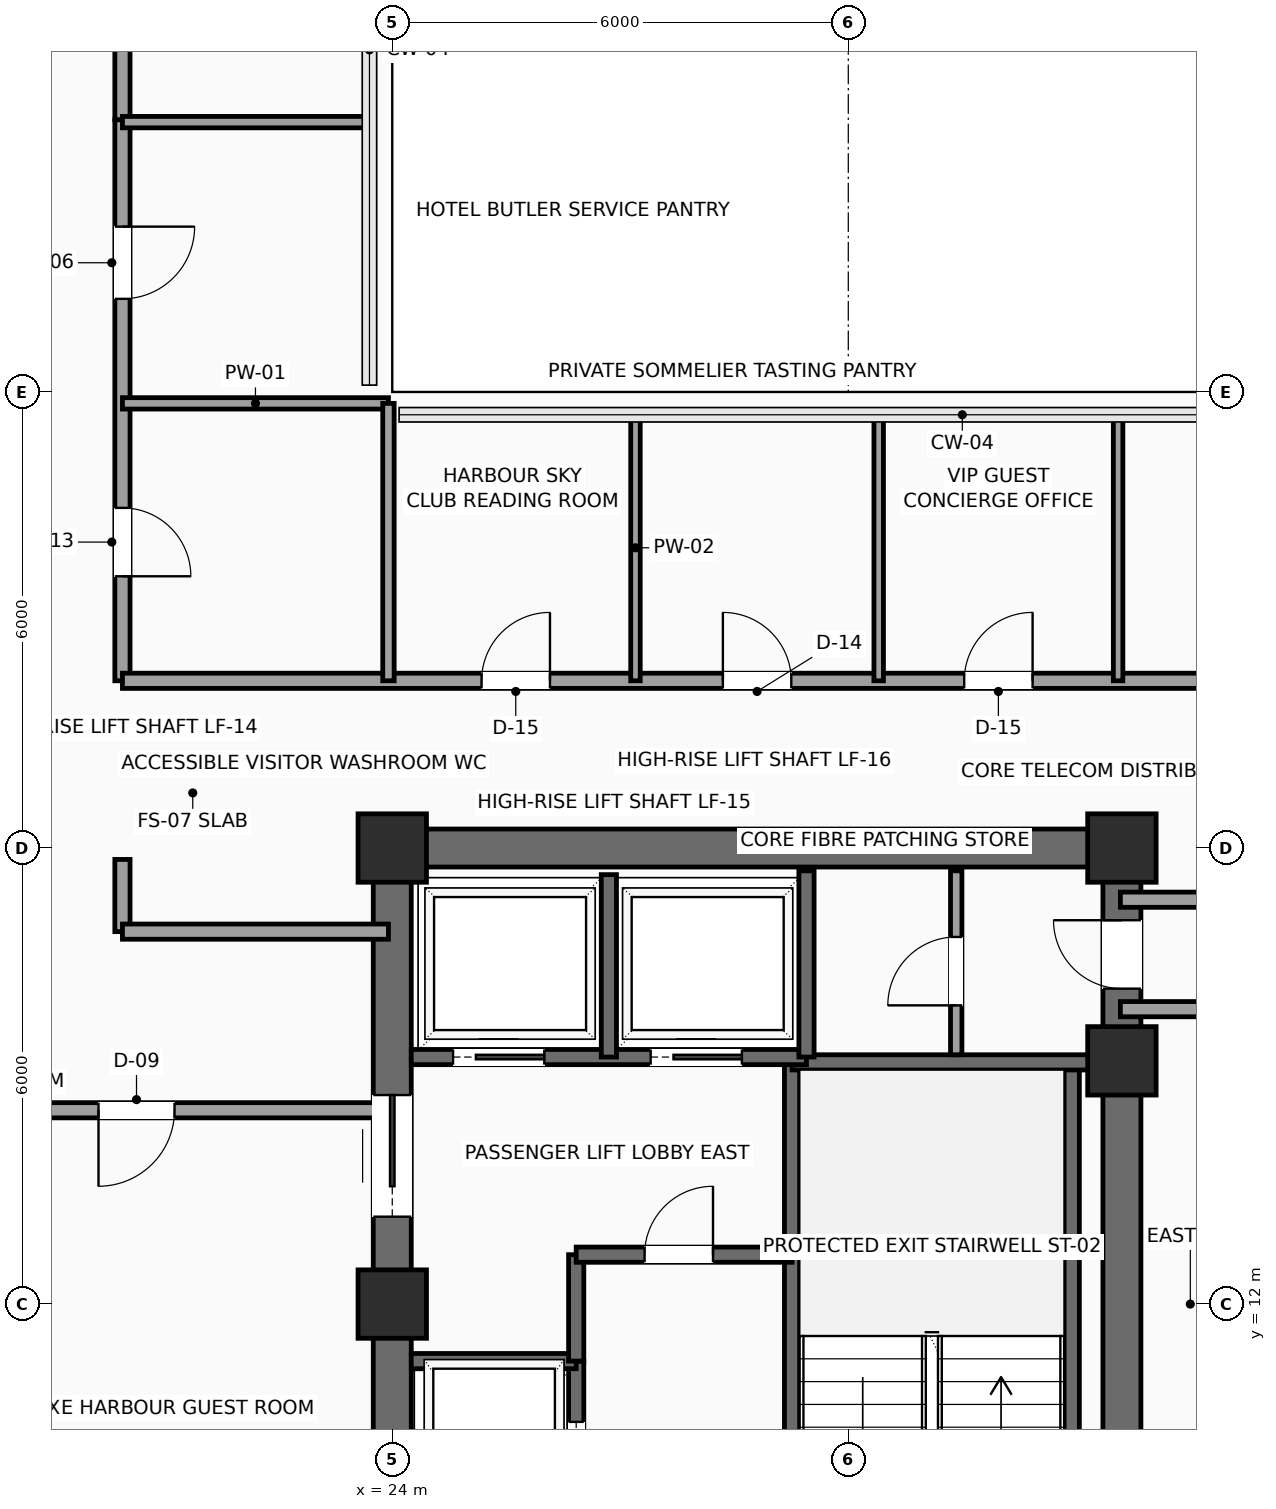
"""IFC4 building model, lengths in metres.
Left out: names, types, materials, properties, quantities, classifications, styles, units other than length and angle.
Written with IfcOpenShell. Run it as: python <this file> out.ifc"""

import sys

from ifc_helpers import new_model, si_unit, direction, frame, frame_2d, origin, origin_2d, place, context, subcontext, project, spatial, rectangle, extrude, element, fill, save


model = new_model("IFC4")
c1 = context("Model", 3, precision=1e-05, world=origin(), true_north=direction((0.0, 1.0)))
c2 = subcontext(c1, "Body", "Model", "MODEL_VIEW")
j1 = project(units=[si_unit("LENGTHUNIT", "METRE"), si_unit("PLANEANGLEUNIT", "RADIAN")], contexts=[c1])
p1 = place(None, origin())
s1 = spatial("IfcSite", under=j1, at=p1, CompositionType="ELEMENT")
p2 = place(p1, origin())
s2 = spatial("IfcBuilding", under=s1, at=p2, CompositionType="ELEMENT")
p3 = place(p2, frame((0.0, 0.0, 216.15)))
s3 = spatial("IfcBuildingStorey", under=s2, at=p3, CompositionType="ELEMENT", Elevation=216.15)
for number, where, z_axis, x_axis in (
    (1, (24.0, 12.0, 0.0), (0.0, 0.0, 1.0), (1.0, 0.0, 0.0)),
    (2, (24.0, 18.0, 0.0), (0.0, 0.0, 1.0), (1.0, 0.0, 0.0)),
    (3, (33.6, 15.2, 0.0), (0.0, 0.0, 1.0), (1.0, 0.0, 0.0)),
    (4, (33.6, 18.0, 0.0), (0.0, 0.0, 1.0), (1.0, 0.0, 0.0)),
):
    element("IfcColumn", number, at=place(p3, frame(where, z_axis=z_axis, x_axis=x_axis)), inside=s3, PredefinedType="COLUMN", context=c2, shape_type="SweptSolid", body=[
        extrude(rectangle(XDim=0.9, YDim=0.9, at=origin_2d()), origin(), (0.0, 0.0, 1.0), 3.75),
    ])
p4 = place(p3, frame((24.0, 18.0, 0.0), z_axis=(0.0, 0.0, 1.0), x_axis=(1.0, 0.0, 0.0)))
e5 = element("IfcWall", 5, at=p4, inside=s3, PredefinedType="SHEAR", context=c2, shape_type="SweptSolid", body=[
    extrude(rectangle(XDim=9.6, YDim=0.5, at=frame_2d((4.8, 0.0))), origin(), (0.0, 0.0, 1.0), 3.54),
])
p5 = place(p3, frame((24.0, 6.0, 0.0), z_axis=(0.0, 0.0, 1.0), x_axis=(0.0, 1.0, 0.0)))
e6 = element("IfcWall", 6, at=p5, inside=s3, PredefinedType="SHEAR", context=c2, shape_type="SweptSolid", body=[
    extrude(rectangle(XDim=12.0, YDim=0.5, at=frame_2d((6.0, 0.0))), origin(), (0.0, 0.0, 1.0), 3.54),
])
p6 = place(p5, frame((7.15, 0.0, 0.0)))
e7 = element("IfcOpeningElement", 7, at=p6, cuts=e6, PredefinedType="OPENING", context=c2, shape_type="SweptSolid", body=[
    extrude(rectangle(XDim=1.6, YDim=2.3, at=frame_2d((0.8, 1.15))), frame((0.0, 0.26, 0.0), z_axis=(0.0, -1.0, 0.0), x_axis=(1.0, 0.0, 0.0)), (0.0, 0.0, 1.0), 0.52),
])
p7 = place(p3, frame((33.6, 6.0, 0.0), z_axis=(0.0, 0.0, 1.0), x_axis=(0.0, 1.0, 0.0)))
e8 = element("IfcWall", 8, at=p7, inside=s3, PredefinedType="SHEAR", context=c2, shape_type="SweptSolid", body=[
    extrude(rectangle(XDim=12.0, YDim=0.5, at=frame_2d((6.0, 0.0))), origin(), (0.0, 0.0, 1.0), 3.54),
])
p8 = place(p7, frame((10.15, 0.0, 0.0)))
e9 = element("IfcOpeningElement", 9, at=p8, cuts=e8, PredefinedType="OPENING", context=c2, shape_type="SweptSolid", body=[
    extrude(rectangle(XDim=0.9, YDim=2.15, at=frame_2d((0.45, 1.075))), frame((0.0, 0.26, 0.0), z_axis=(0.0, -1.0, 0.0), x_axis=(1.0, 0.0, 0.0)), (0.0, 0.0, 1.0), 0.52),
])
p9 = place(p3, frame((29.26, 6.3, 0.0), z_axis=(0.0, 0.0, 1.0), x_axis=(0.0, 1.0, 0.0)))
e10 = element("IfcWall", 10, at=p9, inside=s3, PredefinedType="SHEAR", context=c2, shape_type="SweptSolid", body=[
    extrude(rectangle(XDim=8.88, YDim=0.2, at=frame_2d((4.44, 0.0))), origin(), (0.0, 0.0, 1.0), 3.54),
])
p10 = place(p9, frame((0.35, 0.0, 0.0)))
e11 = element("IfcOpeningElement", 11, at=p10, cuts=e10, PredefinedType="OPENING", context=c2, shape_type="SweptSolid", body=[
    extrude(rectangle(XDim=1.1, YDim=2.2, at=frame_2d((0.55, 1.1))), frame((0.0, 0.11, 0.0), z_axis=(0.0, -1.0, 0.0), x_axis=(1.0, 0.0, 0.0)), (0.0, 0.0, 1.0), 0.22),
])
p11 = place(p3, frame((32.94, 6.3, 0.0), z_axis=(0.0, 0.0, 1.0), x_axis=(0.0, 1.0, 0.0)))
e12 = element("IfcWall", 12, at=p11, inside=s3, PredefinedType="SHEAR", context=c2, shape_type="SweptSolid", body=[
    extrude(rectangle(XDim=8.88, YDim=0.2, at=frame_2d((4.44, 0.0))), origin(), (0.0, 0.0, 1.0), 3.54),
])
p12 = place(p3, frame((29.26, 15.18, 0.0), z_axis=(0.0, 0.0, 1.0), x_axis=(1.0, 0.0, 0.0)))
e13 = element("IfcWall", 13, at=p12, inside=s3, PredefinedType="SHEAR", context=c2, shape_type="SweptSolid", body=[
    extrude(rectangle(XDim=4.04, YDim=0.2, at=frame_2d((2.02, 0.0))), origin(), (0.0, 0.0, 1.0), 3.54),
])
p13 = place(p3, frame((26.42, 6.3, 0.0), z_axis=(0.0, 0.0, 1.0), x_axis=(0.0, 1.0, 0.0)))
e14 = element("IfcWall", 14, at=p13, inside=s3, PredefinedType="SHEAR", context=c2, shape_type="SweptSolid", body=[
    extrude(rectangle(XDim=4.95, YDim=0.2, at=frame_2d((2.475, 0.0))), origin(), (0.0, 0.0, 1.0), 3.54),
])
p14 = place(p13, frame((0.65, 0.0, 0.0)))
e15 = element("IfcOpeningElement", 15, at=p14, cuts=e14, PredefinedType="OPENING", context=c2, shape_type="SweptSolid", body=[
    extrude(rectangle(XDim=1.1, YDim=2.2, at=frame_2d((0.55, 1.1))), frame((0.0, 0.11, 0.0), z_axis=(0.0, -1.0, 0.0), x_axis=(1.0, 0.0, 0.0)), (0.0, 0.0, 1.0), 0.22),
])
p15 = place(p13, frame((3.05, 0.0, 0.0)))
e16 = element("IfcOpeningElement", 16, at=p15, cuts=e14, PredefinedType="OPENING", context=c2, shape_type="SweptSolid", body=[
    extrude(rectangle(XDim=1.1, YDim=2.2, at=frame_2d((0.55, 1.1))), frame((0.0, 0.11, 0.0), z_axis=(0.0, -1.0, 0.0), x_axis=(1.0, 0.0, 0.0)), (0.0, 0.0, 1.0), 0.22),
])
p16 = place(p3, frame((24.25, 11.25, 0.0), z_axis=(0.0, 0.0, 1.0), x_axis=(1.0, 0.0, 0.0)))
e17 = element("IfcWall", 17, at=p16, inside=s3, PredefinedType="SHEAR", context=c2, shape_type="SweptSolid", body=[
    extrude(rectangle(XDim=2.17, YDim=0.2, at=frame_2d((1.085, 0.0))), origin(), (0.0, 0.0, 1.0), 3.54),
])
p17 = place(p3, frame((26.42, 11.25, 0.0), z_axis=(0.0, 0.0, 1.0), x_axis=(0.0, 1.0, 0.0)))
e18 = element("IfcWall", 18, at=p17, inside=s3, PredefinedType="SHEAR", context=c2, shape_type="SweptSolid", body=[
    extrude(rectangle(XDim=1.4, YDim=0.2, at=frame_2d((0.7, 0.0))), origin(), (0.0, 0.0, 1.0), 3.54),
])
p18 = place(p3, frame((26.42, 12.65, 0.0), z_axis=(0.0, 0.0, 1.0), x_axis=(1.0, 0.0, 0.0)))
e19 = element("IfcWall", 19, at=p18, inside=s3, PredefinedType="SHEAR", context=c2, shape_type="SweptSolid", body=[
    extrude(rectangle(XDim=2.84, YDim=0.2, at=frame_2d((1.42, 0.0))), origin(), (0.0, 0.0, 1.0), 3.54),
])
p19 = place(p18, frame((0.9, 0.0, 0.0)))
e20 = element("IfcOpeningElement", 20, at=p19, cuts=e19, PredefinedType="OPENING", context=c2, shape_type="SweptSolid", body=[
    extrude(rectangle(XDim=0.9, YDim=2.15, at=frame_2d((0.45, 1.075))), frame((0.0, 0.11, 0.0), z_axis=(0.0, -1.0, 0.0), x_axis=(1.0, 0.0, 0.0)), (0.0, 0.0, 1.0), 0.22),
])
p20 = place(p3, frame((24.25, 15.25, 0.0), z_axis=(0.0, 0.0, 1.0), x_axis=(1.0, 0.0, 0.0)))
e21 = element("IfcWall", 21, at=p20, inside=s3, PredefinedType="SHEAR", context=c2, shape_type="SweptSolid", body=[
    extrude(rectangle(XDim=5.2, YDim=0.2, at=frame_2d((2.6, 0.0))), origin(), (0.0, 0.0, 1.0), 3.54),
])
p21 = place(p20, frame((0.55, 0.0, 0.0)))
e22 = element("IfcOpeningElement", 22, at=p21, cuts=e21, PredefinedType="OPENING", context=c2, shape_type="SweptSolid", body=[
    extrude(rectangle(XDim=1.2, YDim=2.2, at=frame_2d((0.6, 1.1))), frame((0.0, 0.11, 0.0), z_axis=(0.0, -1.0, 0.0), x_axis=(1.0, 0.0, 0.0)), (0.0, 0.0, 1.0), 0.22),
])
p22 = place(p20, frame((3.15, 0.0, 0.0)))
e23 = element("IfcOpeningElement", 23, at=p22, cuts=e21, PredefinedType="OPENING", context=c2, shape_type="SweptSolid", body=[
    extrude(rectangle(XDim=1.2, YDim=2.2, at=frame_2d((0.6, 1.1))), frame((0.0, 0.11, 0.0), z_axis=(0.0, -1.0, 0.0), x_axis=(1.0, 0.0, 0.0)), (0.0, 0.0, 1.0), 0.22),
])
p23 = place(p3, frame((26.85, 15.25, 0.0), z_axis=(0.0, 0.0, 1.0), x_axis=(0.0, 1.0, 0.0)))
e24 = element("IfcWall", 24, at=p23, inside=s3, PredefinedType="SHEAR", context=c2, shape_type="SweptSolid", body=[
    extrude(rectangle(XDim=2.4, YDim=0.2, at=frame_2d((1.2, 0.0))), origin(), (0.0, 0.0, 1.0), 3.54),
])
p24 = place(p3, frame((29.45, 15.25, 0.0), z_axis=(0.0, 0.0, 1.0), x_axis=(0.0, 1.0, 0.0)))
e25 = element("IfcWall", 25, at=p24, inside=s3, PredefinedType="SHEAR", context=c2, shape_type="SweptSolid", body=[
    extrude(rectangle(XDim=2.45, YDim=0.2, at=frame_2d((1.225, 0.0))), origin(), (0.0, 0.0, 1.0), 3.54),
])
p25 = place(p3, frame((31.42, 15.28, 0.0), z_axis=(0.0, 0.0, 1.0), x_axis=(0.0, 1.0, 0.0)))
e26 = element("IfcWall", 26, at=p25, inside=s3, PredefinedType="PARTITIONING", context=c2, shape_type="SweptSolid", body=[
    extrude(rectangle(XDim=2.42, YDim=0.15, at=frame_2d((1.21, 0.0))), origin(), (0.0, 0.0, 1.0), 3.54),
])
p26 = place(p25, frame((0.65, 0.0, 0.0)))
e27 = element("IfcOpeningElement", 27, at=p26, cuts=e26, PredefinedType="OPENING", context=c2, shape_type="SweptSolid", body=[
    extrude(rectangle(XDim=0.9, YDim=2.15, at=frame_2d((0.45, 1.075))), frame((0.0, 0.085, 0.0), z_axis=(0.0, -1.0, 0.0), x_axis=(1.0, 0.0, 0.0)), (0.0, 0.0, 1.0), 0.17),
])
p27 = place(p3, frame((20.45, 30.25, 0.0), z_axis=(0.0, 0.0, 1.0), x_axis=(0.0, -1.0, 0.0)))
e28 = element("IfcWall", 28, at=p27, inside=s3, PredefinedType="PARTITIONING", context=c2, shape_type="SweptSolid", body=[
    extrude(rectangle(XDim=2.67, YDim=0.2, at=frame_2d((1.335, 0.0))), origin(), (0.0, 0.0, 1.0), 3.54),
])
p28 = place(p3, frame((20.45, 27.58, 0.0), z_axis=(0.0, 0.0, 1.0), x_axis=(0.0, -1.0, 0.0)))
e29 = element("IfcWall", 29, at=p28, inside=s3, PredefinedType="PARTITIONING", context=c2, shape_type="SweptSolid", body=[
    extrude(rectangle(XDim=7.38, YDim=0.2, at=frame_2d((3.69, 0.0))), origin(), (0.0, 0.0, 1.0), 3.54),
])
p29 = place(p28, frame((5.105, 0.0, 0.0)))
e30 = element("IfcOpeningElement", 30, at=p29, cuts=e29, PredefinedType="OPENING", context=c2, shape_type="SweptSolid", body=[
    extrude(rectangle(XDim=0.9, YDim=2.1, at=frame_2d((0.45, 1.05))), frame((0.0, 0.11, 0.0), z_axis=(0.0, -1.0, 0.0), x_axis=(1.0, 0.0, 0.0)), (0.0, 0.0, 1.0), 0.22),
])
p30 = place(p28, frame((1.405, 0.0, 0.0)))
e31 = element("IfcOpeningElement", 31, at=p30, cuts=e29, PredefinedType="OPENING", context=c2, shape_type="SweptSolid", body=[
    extrude(rectangle(XDim=0.95, YDim=2.15, at=frame_2d((0.475, 1.075))), frame((0.0, 0.11, 0.0), z_axis=(0.0, -1.0, 0.0), x_axis=(1.0, 0.0, 0.0)), (0.0, 0.0, 1.0), 0.22),
])
p31 = place(p3, frame((20.45, 20.2, 0.0), z_axis=(0.0, 0.0, 1.0), x_axis=(1.0, 0.0, 0.0)))
e32 = element("IfcWall", 32, at=p31, inside=s3, PredefinedType="PARTITIONING", context=c2, shape_type="SweptSolid", body=[
    extrude(rectangle(XDim=15.7, YDim=0.2, at=frame_2d((7.85, 0.0))), origin(), (0.0, 0.0, 1.0), 3.54),
])
p32 = place(p31, frame((4.725, 0.0, 0.0)))
e33 = element("IfcOpeningElement", 33, at=p32, cuts=e32, PredefinedType="OPENING", context=c2, shape_type="SweptSolid", body=[
    extrude(rectangle(XDim=0.9, YDim=2.1, at=frame_2d((0.45, 1.05))), frame((0.0, 0.11, 0.0), z_axis=(0.0, -1.0, 0.0), x_axis=(1.0, 0.0, 0.0)), (0.0, 0.0, 1.0), 0.22),
])
p33 = place(p31, frame((7.9, 0.0, 0.0)))
e34 = element("IfcOpeningElement", 34, at=p33, cuts=e32, PredefinedType="OPENING", context=c2, shape_type="SweptSolid", body=[
    extrude(rectangle(XDim=0.9, YDim=2.1, at=frame_2d((0.45, 1.05))), frame((0.0, 0.11, 0.0), z_axis=(0.0, -1.0, 0.0), x_axis=(1.0, 0.0, 0.0)), (0.0, 0.0, 1.0), 0.22),
])
p34 = place(p31, frame((11.075, 0.0, 0.0)))
e35 = element("IfcOpeningElement", 35, at=p34, cuts=e32, PredefinedType="OPENING", context=c2, shape_type="SweptSolid", body=[
    extrude(rectangle(XDim=0.9, YDim=2.1, at=frame_2d((0.45, 1.05))), frame((0.0, 0.11, 0.0), z_axis=(0.0, -1.0, 0.0), x_axis=(1.0, 0.0, 0.0)), (0.0, 0.0, 1.0), 0.22),
])
for number, where, z_axis, x_axis in (
    (36, (36.15, 15.88, 0.0), (0.0, 0.0, 1.0), (-1.0, 0.0, 0.0)),
    (37, (33.58, 17.32, 0.0), (0.0, 0.0, 1.0), (1.0, 0.0, 0.0)),
):
    element("IfcWall", number, at=place(p3, frame(where, z_axis=z_axis, x_axis=x_axis)), inside=s3, PredefinedType="PARTITIONING", context=c2, shape_type="SweptSolid", body=[
        extrude(rectangle(XDim=2.57, YDim=0.2, at=frame_2d((1.285, 0.0))), origin(), (0.0, 0.0, 1.0), 3.54),
    ])
p35 = place(p3, frame((20.45, 17.85, 0.0), z_axis=(0.0, 0.0, 1.0), x_axis=(0.0, -1.0, 0.0)))
e38 = element("IfcWall", 38, at=p35, inside=s3, PredefinedType="PARTITIONING", context=c2, shape_type="SweptSolid", body=[
    extrude(rectangle(XDim=0.95, YDim=0.2, at=frame_2d((0.475, 0.0))), origin(), (0.0, 0.0, 1.0), 3.54),
])
p36 = place(p3, frame((20.45, 16.9, 0.0), z_axis=(0.0, 0.0, 1.0), x_axis=(1.0, 0.0, 0.0)))
e39 = element("IfcWall", 39, at=p36, inside=s3, PredefinedType="PARTITIONING", context=c2, shape_type="SweptSolid", body=[
    extrude(rectangle(XDim=3.5, YDim=0.2, at=frame_2d((1.75, 0.0))), origin(), (0.0, 0.0, 1.0), 3.54),
])
p37 = place(p3, frame((23.95, 14.55, 0.0), z_axis=(0.0, 0.0, 1.0), x_axis=(-1.0, 0.0, 0.0)))
e40 = element("IfcWall", 40, at=p37, inside=s3, PredefinedType="PARTITIONING", context=c2, shape_type="SweptSolid", body=[
    extrude(rectangle(XDim=9.0, YDim=0.2, at=frame_2d((4.5, 0.0))), origin(), (0.0, 0.0, 1.0), 3.54),
])
p38 = place(p37, frame((2.815, 0.0, 0.0)))
e41 = element("IfcOpeningElement", 41, at=p38, cuts=e40, PredefinedType="OPENING", context=c2, shape_type="SweptSolid", body=[
    extrude(rectangle(XDim=1.0, YDim=2.2, at=frame_2d((0.5, 1.1))), frame((0.0, 0.11, 0.0), z_axis=(0.0, -1.0, 0.0), x_axis=(1.0, 0.0, 0.0)), (0.0, 0.0, 1.0), 0.22),
])
p39 = place(p3, frame((20.45, 23.85, 0.0), z_axis=(0.0, 0.0, 1.0), x_axis=(1.0, 0.0, 0.0)))
e42 = element("IfcWall", 42, at=p39, inside=s3, PredefinedType="PARTITIONING", context=c2, shape_type="SweptSolid", body=[
    extrude(rectangle(XDim=3.5, YDim=0.15, at=frame_2d((1.75, 0.0))), origin(), (0.0, 0.0, 1.0), 3.54),
])
p40 = place(p3, frame((23.95, 20.2, 0.0), z_axis=(0.0, 0.0, 1.0), x_axis=(0.0, 1.0, 0.0)))
e43 = element("IfcWall", 43, at=p40, inside=s3, PredefinedType="PARTITIONING", context=c2, shape_type="SweptSolid", body=[
    extrude(rectangle(XDim=3.65, YDim=0.15, at=frame_2d((1.825, 0.0))), origin(), (0.0, 0.0, 1.0), 3.54),
])
p41 = place(p3, frame((20.45, 27.55, 0.0), z_axis=(0.0, 0.0, 1.0), x_axis=(1.0, 0.0, 0.0)))
e44 = element("IfcWall", 44, at=p41, inside=s3, PredefinedType="PARTITIONING", context=c2, shape_type="SweptSolid", body=[
    extrude(rectangle(XDim=3.25, YDim=0.15, at=frame_2d((1.625, 0.0))), origin(), (0.0, 0.0, 1.0), 3.54),
])
for number, where, z_axis, x_axis in (
    (45, (27.2, 20.2, 0.0), (0.0, 0.0, 1.0), (0.0, 1.0, 0.0)),
    (46, (30.4, 20.2, 0.0), (0.0, 0.0, 1.0), (0.0, 1.0, 0.0)),
    (47, (33.55, 20.2, 0.0), (0.0, 0.0, 1.0), (0.0, 1.0, 0.0)),
):
    element("IfcWall", number, at=place(p3, frame(where, z_axis=z_axis, x_axis=x_axis)), inside=s3, PredefinedType="PARTITIONING", context=c2, shape_type="SweptSolid", body=[
        extrude(rectangle(XDim=3.5, YDim=0.125, at=frame_2d((1.75, 0.0))), origin(), (0.0, 0.0, 1.0), 3.54),
    ])
p42 = place(p6, origin())
e48 = element("IfcDoor", 48, at=p42, inside=s3, OperationType="DOUBLE_DOOR_SLIDING", PredefinedType="DOOR", context=c2, shape_type="SweptSolid", body=[
    extrude(rectangle(XDim=1.6, YDim=2.3, at=frame_2d((0.8, 1.15))), frame((0.0, 0.025, 0.0), z_axis=(0.0, -1.0, 0.0), x_axis=(1.0, 0.0, 0.0)), (0.0, 0.0, 1.0), 0.05),
])
fill(e7, e48)
p43 = place(p8, origin())
e49 = element("IfcDoor", 49, at=p43, inside=s3, OperationType="SINGLE_SWING_RIGHT", PredefinedType="DOOR", context=c2, shape_type="SweptSolid", body=[
    extrude(rectangle(XDim=0.9, YDim=2.15, at=frame_2d((0.45, 1.075))), frame((0.0, 0.025, 0.0), z_axis=(0.0, -1.0, 0.0), x_axis=(1.0, 0.0, 0.0)), (0.0, 0.0, 1.0), 0.05),
])
fill(e9, e49)
p44 = place(p15, origin())
e50 = element("IfcDoor", 50, at=p44, inside=s3, OperationType="SLIDING_TO_LEFT", PredefinedType="DOOR", context=c2, shape_type="SweptSolid", body=[
    extrude(rectangle(XDim=1.1, YDim=2.2, at=frame_2d((0.55, 1.1))), frame((0.0, 0.025, 0.0), z_axis=(0.0, -1.0, 0.0), x_axis=(1.0, 0.0, 0.0)), (0.0, 0.0, 1.0), 0.05),
])
fill(e16, e50)
p45 = place(p19, origin())
e51 = element("IfcDoor", 51, at=p45, inside=s3, OperationType="SINGLE_SWING_RIGHT", PredefinedType="DOOR", context=c2, shape_type="SweptSolid", body=[
    extrude(rectangle(XDim=0.9, YDim=2.15, at=frame_2d((0.45, 1.075))), frame((0.0, 0.025, 0.0), z_axis=(0.0, -1.0, 0.0), x_axis=(1.0, 0.0, 0.0)), (0.0, 0.0, 1.0), 0.05),
])
fill(e20, e51)
p46 = place(p21, origin())
e52 = element("IfcDoor", 52, at=p46, inside=s3, OperationType="SLIDING_TO_RIGHT", PredefinedType="DOOR", context=c2, shape_type="SweptSolid", body=[
    extrude(rectangle(XDim=1.2, YDim=2.2, at=frame_2d((0.6, 1.1))), frame((0.0, 0.025, 0.0), z_axis=(0.0, -1.0, 0.0), x_axis=(1.0, 0.0, 0.0)), (0.0, 0.0, 1.0), 0.05),
])
fill(e22, e52)
p47 = place(p22, origin())
e53 = element("IfcDoor", 53, at=p47, inside=s3, OperationType="SLIDING_TO_RIGHT", PredefinedType="DOOR", context=c2, shape_type="SweptSolid", body=[
    extrude(rectangle(XDim=1.2, YDim=2.2, at=frame_2d((0.6, 1.1))), frame((0.0, 0.025, 0.0), z_axis=(0.0, -1.0, 0.0), x_axis=(1.0, 0.0, 0.0)), (0.0, 0.0, 1.0), 0.05),
])
fill(e23, e53)
p48 = place(p26, origin())
e54 = element("IfcDoor", 54, at=p48, inside=s3, OperationType="SINGLE_SWING_LEFT", PredefinedType="DOOR", context=c2, shape_type="SweptSolid", body=[
    extrude(rectangle(XDim=0.9, YDim=2.15, at=frame_2d((0.45, 1.075))), frame((0.0, 0.025, 0.0), z_axis=(0.0, -1.0, 0.0), x_axis=(1.0, 0.0, 0.0)), (0.0, 0.0, 1.0), 0.05),
])
fill(e27, e54)
p49 = place(p29, origin())
e55 = element("IfcDoor", 55, at=p49, inside=s3, OperationType="SINGLE_SWING_RIGHT", PredefinedType="DOOR", context=c2, shape_type="SweptSolid", body=[
    extrude(rectangle(XDim=0.9, YDim=2.1, at=frame_2d((0.45, 1.05))), frame((0.0, 0.025, 0.0), z_axis=(0.0, -1.0, 0.0), x_axis=(1.0, 0.0, 0.0)), (0.0, 0.0, 1.0), 0.05),
])
fill(e30, e55)
p50 = place(p30, origin())
e56 = element("IfcDoor", 56, at=p50, inside=s3, OperationType="SINGLE_SWING_LEFT", PredefinedType="DOOR", context=c2, shape_type="SweptSolid", body=[
    extrude(rectangle(XDim=0.95, YDim=2.15, at=frame_2d((0.475, 1.075))), frame((0.0, 0.025, 0.0), z_axis=(0.0, -1.0, 0.0), x_axis=(1.0, 0.0, 0.0)), (0.0, 0.0, 1.0), 0.05),
])
fill(e31, e56)
p51 = place(p32, origin())
e57 = element("IfcDoor", 57, at=p51, inside=s3, OperationType="SINGLE_SWING_RIGHT", PredefinedType="DOOR", context=c2, shape_type="SweptSolid", body=[
    extrude(rectangle(XDim=0.9, YDim=2.1, at=frame_2d((0.45, 1.05))), frame((0.0, 0.025, 0.0), z_axis=(0.0, -1.0, 0.0), x_axis=(1.0, 0.0, 0.0)), (0.0, 0.0, 1.0), 0.05),
])
fill(e33, e57)
p52 = place(p33, origin())
e58 = element("IfcDoor", 58, at=p52, inside=s3, OperationType="SINGLE_SWING_LEFT", PredefinedType="DOOR", context=c2, shape_type="SweptSolid", body=[
    extrude(rectangle(XDim=0.9, YDim=2.1, at=frame_2d((0.45, 1.05))), frame((0.0, 0.025, 0.0), z_axis=(0.0, -1.0, 0.0), x_axis=(1.0, 0.0, 0.0)), (0.0, 0.0, 1.0), 0.05),
])
fill(e34, e58)
p53 = place(p34, origin())
e59 = element("IfcDoor", 59, at=p53, inside=s3, OperationType="SINGLE_SWING_RIGHT", PredefinedType="DOOR", context=c2, shape_type="SweptSolid", body=[
    extrude(rectangle(XDim=0.9, YDim=2.1, at=frame_2d((0.45, 1.05))), frame((0.0, 0.025, 0.0), z_axis=(0.0, -1.0, 0.0), x_axis=(1.0, 0.0, 0.0)), (0.0, 0.0, 1.0), 0.05),
])
fill(e35, e59)
p54 = place(p38, origin())
e60 = element("IfcDoor", 60, at=p54, inside=s3, OperationType="SINGLE_SWING_RIGHT", PredefinedType="DOOR", context=c2, shape_type="SweptSolid", body=[
    extrude(rectangle(XDim=1.0, YDim=2.2, at=frame_2d((0.5, 1.1))), frame((0.0, 0.025, 0.0), z_axis=(0.0, -1.0, 0.0), x_axis=(1.0, 0.0, 0.0)), (0.0, 0.0, 1.0), 0.05),
])
fill(e41, e60)
save(model, sys.argv[1])
